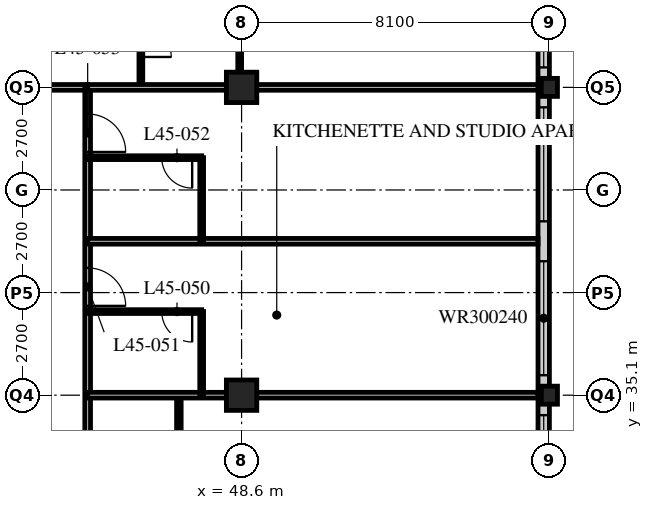
"""IFC4 building model, lengths in metres.
Left out: names, types, materials, properties, quantities, classifications, styles, units other than length and angle.
Written with IfcOpenShell. Run it as: python <this file> out.ifc"""

import sys

from ifc_helpers import new_model, si_unit, direction, frame, frame_2d, origin, origin_2d, place, context, subcontext, project, spatial, rectangle, hollow_rectangle, i_section, extrude, element, fill, save


model = new_model("IFC4")
c1 = context("Model", 3, precision=1e-05, world=origin(), true_north=direction((0.0, 1.0)))
c2 = subcontext(c1, "Body", "Model", "MODEL_VIEW")
j1 = project(units=[si_unit("LENGTHUNIT", "METRE"), si_unit("PLANEANGLEUNIT", "RADIAN")], contexts=[c1])
p1 = place(None, origin())
s1 = spatial("IfcSite", under=j1, at=p1, CompositionType="ELEMENT")
p2 = place(p1, origin())
s2 = spatial("IfcBuilding", under=s1, at=p2, CompositionType="ELEMENT")
p3 = place(p2, frame((0.0, 0.0, 177.6)))
s3 = spatial("IfcBuildingStorey", under=s2, at=p3, CompositionType="ELEMENT", Elevation=177.6)
for number, where, z_axis, x_axis in (
    (1, (48.6, 35.1, 0.0), (0.0, 0.0, 1.0), (1.0, 0.0, 0.0)),
    (2, (48.6, 43.2, 0.0), (0.0, 0.0, 1.0), (1.0, 0.0, 0.0)),
):
    element("IfcColumn", number, at=place(p3, frame(where, z_axis=z_axis, x_axis=x_axis)), inside=s3, PredefinedType="COLUMN", context=c2, shape_type="SweptSolid", body=[
        extrude(hollow_rectangle(XDim=0.8, YDim=0.8, WallThickness=0.08, at=origin_2d()), origin(), (0.0, 0.0, 1.0), 3.6),
    ])
for number, where, z_axis, x_axis in (
    (3, (56.7, 35.1, 0.0), (0.0, 0.0, 1.0), (1.0, 0.0, 0.0)),
    (4, (56.7, 43.2, 0.0), (0.0, 0.0, 1.0), (1.0, 0.0, 0.0)),
):
    element("IfcColumn", number, at=place(p3, frame(where, z_axis=z_axis, x_axis=x_axis)), inside=s3, PredefinedType="COLUMN", context=c2, shape_type="SweptSolid", body=[
        extrude(i_section(OverallWidth=0.424, OverallDepth=0.475, WebThickness=0.048, FlangeThickness=0.077, FilletRadius=0.015, at=origin_2d()), origin(), (0.0, 0.0, 1.0), 3.6),
    ])
p4 = place(p3, frame((56.55, 19.2, 0.0), z_axis=(0.0, 0.0, 1.0), x_axis=(0.0, 1.0, 0.0)))
e5 = element("IfcWall", 5, at=p4, inside=s3, PredefinedType="SOLIDWALL", context=c2, shape_type="SweptSolid", body=[
    extrude(rectangle(XDim=32.1, YDim=0.3, at=frame_2d((16.05, 0.0))), origin(), (0.0, 0.0, 1.0), 3.39),
])
p5 = place(p4, frame((0.225, 0.0, 0.6)))
e6 = element("IfcOpeningElement", 6, at=p5, cuts=e5, PredefinedType="OPENING", context=c2, shape_type="SweptSolid", body=[
    extrude(rectangle(XDim=3.0, YDim=2.4, at=frame_2d((1.5, 1.2))), frame((0.0, 0.16, 0.0), z_axis=(0.0, -1.0, 0.0), x_axis=(1.0, 0.0, 0.0)), (0.0, 0.0, 1.0), 0.32),
])
p6 = place(p4, frame((4.275, 0.0, 0.6)))
e7 = element("IfcOpeningElement", 7, at=p6, cuts=e5, PredefinedType="OPENING", context=c2, shape_type="SweptSolid", body=[
    extrude(rectangle(XDim=3.0, YDim=2.4, at=frame_2d((1.5, 1.2))), frame((0.0, 0.16, 0.0), z_axis=(0.0, -1.0, 0.0), x_axis=(1.0, 0.0, 0.0)), (0.0, 0.0, 1.0), 0.32),
])
p7 = place(p4, frame((8.325, 0.0, 0.6)))
e8 = element("IfcOpeningElement", 8, at=p7, cuts=e5, PredefinedType="OPENING", context=c2, shape_type="SweptSolid", body=[
    extrude(rectangle(XDim=3.0, YDim=2.4, at=frame_2d((1.5, 1.2))), frame((0.0, 0.16, 0.0), z_axis=(0.0, -1.0, 0.0), x_axis=(1.0, 0.0, 0.0)), (0.0, 0.0, 1.0), 0.32),
])
p8 = place(p4, frame((12.375, 0.0, 0.6)))
e9 = element("IfcOpeningElement", 9, at=p8, cuts=e5, PredefinedType="OPENING", context=c2, shape_type="SweptSolid", body=[
    extrude(rectangle(XDim=3.0, YDim=2.4, at=frame_2d((1.5, 1.2))), frame((0.0, 0.16, 0.0), z_axis=(0.0, -1.0, 0.0), x_axis=(1.0, 0.0, 0.0)), (0.0, 0.0, 1.0), 0.32),
])
p9 = place(p4, frame((16.425, 0.0, 0.6)))
e10 = element("IfcOpeningElement", 10, at=p9, cuts=e5, PredefinedType="OPENING", context=c2, shape_type="SweptSolid", body=[
    extrude(rectangle(XDim=3.0, YDim=2.4, at=frame_2d((1.5, 1.2))), frame((0.0, 0.16, 0.0), z_axis=(0.0, -1.0, 0.0), x_axis=(1.0, 0.0, 0.0)), (0.0, 0.0, 1.0), 0.32),
])
p10 = place(p4, frame((20.475, 0.0, 0.6)))
e11 = element("IfcOpeningElement", 11, at=p10, cuts=e5, PredefinedType="OPENING", context=c2, shape_type="SweptSolid", body=[
    extrude(rectangle(XDim=3.0, YDim=2.4, at=frame_2d((1.5, 1.2))), frame((0.0, 0.16, 0.0), z_axis=(0.0, -1.0, 0.0), x_axis=(1.0, 0.0, 0.0)), (0.0, 0.0, 1.0), 0.32),
])
p11 = place(p4, frame((24.525, 0.0, 0.6)))
e12 = element("IfcOpeningElement", 12, at=p11, cuts=e5, PredefinedType="OPENING", context=c2, shape_type="SweptSolid", body=[
    extrude(rectangle(XDim=3.0, YDim=2.4, at=frame_2d((1.5, 1.2))), frame((0.0, 0.16, 0.0), z_axis=(0.0, -1.0, 0.0), x_axis=(1.0, 0.0, 0.0)), (0.0, 0.0, 1.0), 0.32),
])
p12 = place(p4, frame((28.575, 0.0, 0.6)))
e13 = element("IfcOpeningElement", 13, at=p12, cuts=e5, PredefinedType="OPENING", context=c2, shape_type="SweptSolid", body=[
    extrude(rectangle(XDim=3.0, YDim=2.4, at=frame_2d((1.5, 1.2))), frame((0.0, 0.16, 0.0), z_axis=(0.0, -1.0, 0.0), x_axis=(1.0, 0.0, 0.0)), (0.0, 0.0, 1.0), 0.32),
])
p13 = place(p3, frame((12.15, 43.2, 0.0), z_axis=(0.0, 0.0, 1.0), x_axis=(1.0, 0.0, 0.0)))
e14 = element("IfcWall", 14, at=p13, inside=s3, PredefinedType="PARTITIONING", context=c2, shape_type="SweptSolid", body=[
    extrude(rectangle(XDim=32.4, YDim=0.15, at=frame_2d((16.2, 0.0))), origin(), (0.0, 0.0, 1.0), 2.778),
])
p14 = place(p13, frame((4.95, 0.0, 0.0)))
e15 = element("IfcOpeningElement", 15, at=p14, cuts=e14, PredefinedType="OPENING", context=c2, shape_type="SweptSolid", body=[
    extrude(rectangle(XDim=1.0, YDim=2.1, at=frame_2d((0.5, 1.05))), frame((0.0, 0.085, 0.0), z_axis=(0.0, -1.0, 0.0), x_axis=(1.0, 0.0, 0.0)), (0.0, 0.0, 1.0), 0.17),
])
p15 = place(p13, frame((13.05, 0.0, 0.0)))
e16 = element("IfcOpeningElement", 16, at=p15, cuts=e14, PredefinedType="OPENING", context=c2, shape_type="SweptSolid", body=[
    extrude(rectangle(XDim=1.0, YDim=2.1, at=frame_2d((0.5, 1.05))), frame((0.0, 0.085, 0.0), z_axis=(0.0, -1.0, 0.0), x_axis=(1.0, 0.0, 0.0)), (0.0, 0.0, 1.0), 0.17),
])
p16 = place(p13, frame((21.15, 0.0, 0.0)))
e17 = element("IfcOpeningElement", 17, at=p16, cuts=e14, PredefinedType="OPENING", context=c2, shape_type="SweptSolid", body=[
    extrude(rectangle(XDim=1.0, YDim=2.1, at=frame_2d((0.5, 1.05))), frame((0.0, 0.085, 0.0), z_axis=(0.0, -1.0, 0.0), x_axis=(1.0, 0.0, 0.0)), (0.0, 0.0, 1.0), 0.17),
])
p17 = place(p13, frame((29.875, 0.0, 0.0)))
e18 = element("IfcOpeningElement", 18, at=p17, cuts=e14, PredefinedType="OPENING", context=c2, shape_type="SweptSolid", body=[
    extrude(rectangle(XDim=1.0, YDim=2.1, at=frame_2d((0.5, 1.05))), frame((0.0, 0.085, 0.0), z_axis=(0.0, -1.0, 0.0), x_axis=(1.0, 0.0, 0.0)), (0.0, 0.0, 1.0), 0.17),
])
p18 = place(p13, frame((1.525, 0.0, 0.0)))
e19 = element("IfcOpeningElement", 19, at=p18, cuts=e14, PredefinedType="OPENING", context=c2, shape_type="SweptSolid", body=[
    extrude(rectangle(XDim=1.0, YDim=2.1, at=frame_2d((0.5, 1.05))), frame((0.0, 0.085, 0.0), z_axis=(0.0, -1.0, 0.0), x_axis=(1.0, 0.0, 0.0)), (0.0, 0.0, 1.0), 0.17),
])
p19 = place(p3, frame((44.55, 18.9, 0.0), z_axis=(0.0, 0.0, 1.0), x_axis=(0.0, 1.0, 0.0)))
e20 = element("IfcWall", 20, at=p19, inside=s3, PredefinedType="PARTITIONING", context=c2, shape_type="SweptSolid", body=[
    extrude(rectangle(XDim=24.3, YDim=0.15, at=frame_2d((12.15, 0.0))), origin(), (0.0, 0.0, 1.0), 3.39),
])
p20 = place(p19, frame((2.35, 0.0, 0.0)))
e21 = element("IfcOpeningElement", 21, at=p20, cuts=e20, PredefinedType="OPENING", context=c2, shape_type="SweptSolid", body=[
    extrude(rectangle(XDim=1.0, YDim=2.1, at=frame_2d((0.5, 1.05))), frame((0.0, 0.085, 0.0), z_axis=(0.0, -1.0, 0.0), x_axis=(1.0, 0.0, 0.0)), (0.0, 0.0, 1.0), 0.17),
])
p21 = place(p19, frame((4.45, 0.0, 0.0)))
e22 = element("IfcOpeningElement", 22, at=p21, cuts=e20, PredefinedType="OPENING", context=c2, shape_type="SweptSolid", body=[
    extrude(rectangle(XDim=1.0, YDim=2.1, at=frame_2d((0.5, 1.05))), frame((0.0, 0.085, 0.0), z_axis=(0.0, -1.0, 0.0), x_axis=(1.0, 0.0, 0.0)), (0.0, 0.0, 1.0), 0.17),
])
p22 = place(p19, frame((18.55, 0.0, 0.0)))
e23 = element("IfcOpeningElement", 23, at=p22, cuts=e20, PredefinedType="OPENING", context=c2, shape_type="SweptSolid", body=[
    extrude(rectangle(XDim=1.0, YDim=2.1, at=frame_2d((0.5, 1.05))), frame((0.0, 0.085, 0.0), z_axis=(0.0, -1.0, 0.0), x_axis=(1.0, 0.0, 0.0)), (0.0, 0.0, 1.0), 0.17),
])
p23 = place(p19, frame((22.6, 0.0, 0.0)))
e24 = element("IfcOpeningElement", 24, at=p23, cuts=e20, PredefinedType="OPENING", context=c2, shape_type="SweptSolid", body=[
    extrude(rectangle(XDim=1.0, YDim=2.1, at=frame_2d((0.5, 1.05))), frame((0.0, 0.085, 0.0), z_axis=(0.0, -1.0, 0.0), x_axis=(1.0, 0.0, 0.0)), (0.0, 0.0, 1.0), 0.17),
])
p24 = place(p3, frame((46.95, 22.95, 0.0), z_axis=(0.0, 0.0, 1.0), x_axis=(0.0, 1.0, 0.0)))
e25 = element("IfcWall", 25, at=p24, inside=s3, PredefinedType="PARTITIONING", context=c2, shape_type="SweptSolid", body=[
    extrude(rectangle(XDim=12.15, YDim=0.12, at=frame_2d((6.075, 0.0))), origin(), (0.0, 0.0, 1.0), 3.39),
])
p25 = place(p24, frame((0.975, 0.0, 0.0)))
e26 = element("IfcOpeningElement", 26, at=p25, cuts=e25, PredefinedType="OPENING", context=c2, shape_type="SweptSolid", body=[
    extrude(rectangle(XDim=0.85, YDim=2.1, at=frame_2d((0.425, 1.05))), frame((0.0, 0.07, 0.0), z_axis=(0.0, -1.0, 0.0), x_axis=(1.0, 0.0, 0.0)), (0.0, 0.0, 1.0), 0.14),
])
p26 = place(p24, frame((8.425, 0.0, 0.0)))
e27 = element("IfcOpeningElement", 27, at=p26, cuts=e25, PredefinedType="OPENING", context=c2, shape_type="SweptSolid", body=[
    extrude(rectangle(XDim=0.85, YDim=2.1, at=frame_2d((0.425, 1.05))), frame((0.0, 0.07, 0.0), z_axis=(0.0, -1.0, 0.0), x_axis=(1.0, 0.0, 0.0)), (0.0, 0.0, 1.0), 0.14),
])
p27 = place(p3, frame((44.55, 35.1, 0.0), z_axis=(0.0, 0.0, 1.0), x_axis=(1.0, 0.0, 0.0)))
e28 = element("IfcWall", 28, at=p27, inside=s3, PredefinedType="PARTITIONING", context=c2, shape_type="SweptSolid", body=[
    extrude(rectangle(XDim=11.85, YDim=0.15, at=frame_2d((5.925, 0.0))), origin(), (0.0, 0.0, 1.0), 2.778),
])
p28 = place(p3, frame((47.55, 35.1, 0.0), z_axis=(0.0, 0.0, 1.0), x_axis=(0.0, 1.0, 0.0)))
e29 = element("IfcWall", 29, at=p28, inside=s3, PredefinedType="PARTITIONING", context=c2, shape_type="SweptSolid", body=[
    extrude(rectangle(XDim=2.2, YDim=0.1, at=frame_2d((1.1, 0.0))), origin(), (0.0, 0.0, 1.0), 3.39),
])
p29 = place(p3, frame((44.55, 37.3, 0.0), z_axis=(0.0, 0.0, 1.0), x_axis=(1.0, 0.0, 0.0)))
e30 = element("IfcWall", 30, at=p29, inside=s3, PredefinedType="PARTITIONING", context=c2, shape_type="SweptSolid", body=[
    extrude(rectangle(XDim=3.0, YDim=0.1, at=frame_2d((1.5, 0.0))), origin(), (0.0, 0.0, 1.0), 3.39),
])
p30 = place(p29, frame((1.95, 0.0, 0.0)))
e31 = element("IfcOpeningElement", 31, at=p30, cuts=e30, PredefinedType="OPENING", context=c2, shape_type="SweptSolid", body=[
    extrude(rectangle(XDim=0.8, YDim=2.1, at=frame_2d((0.4, 1.05))), frame((0.0, 0.06, 0.0), z_axis=(0.0, -1.0, 0.0), x_axis=(1.0, 0.0, 0.0)), (0.0, 0.0, 1.0), 0.12),
])
p31 = place(p3, frame((44.55, 39.15, 0.0), z_axis=(0.0, 0.0, 1.0), x_axis=(1.0, 0.0, 0.0)))
e32 = element("IfcWall", 32, at=p31, inside=s3, PredefinedType="PARTITIONING", context=c2, shape_type="SweptSolid", body=[
    extrude(rectangle(XDim=11.85, YDim=0.15, at=frame_2d((5.925, 0.0))), origin(), (0.0, 0.0, 1.0), 3.39),
])
p32 = place(p3, frame((47.55, 39.15, 0.0), z_axis=(0.0, 0.0, 1.0), x_axis=(0.0, 1.0, 0.0)))
e33 = element("IfcWall", 33, at=p32, inside=s3, PredefinedType="PARTITIONING", context=c2, shape_type="SweptSolid", body=[
    extrude(rectangle(XDim=2.2, YDim=0.1, at=frame_2d((1.1, 0.0))), origin(), (0.0, 0.0, 1.0), 3.39),
])
p33 = place(p3, frame((44.55, 41.35, 0.0), z_axis=(0.0, 0.0, 1.0), x_axis=(1.0, 0.0, 0.0)))
e34 = element("IfcWall", 34, at=p33, inside=s3, PredefinedType="PARTITIONING", context=c2, shape_type="SweptSolid", body=[
    extrude(rectangle(XDim=3.0, YDim=0.1, at=frame_2d((1.5, 0.0))), origin(), (0.0, 0.0, 1.0), 3.39),
])
p34 = place(p33, frame((1.95, 0.0, 0.0)))
e35 = element("IfcOpeningElement", 35, at=p34, cuts=e34, PredefinedType="OPENING", context=c2, shape_type="SweptSolid", body=[
    extrude(rectangle(XDim=0.8, YDim=2.1, at=frame_2d((0.4, 1.05))), frame((0.0, 0.06, 0.0), z_axis=(0.0, -1.0, 0.0), x_axis=(1.0, 0.0, 0.0)), (0.0, 0.0, 1.0), 0.12),
])
p35 = place(p3, frame((45.95, 43.2, 0.0), z_axis=(0.0, 0.0, 1.0), x_axis=(0.0, 1.0, 0.0)))
e36 = element("IfcWall", 36, at=p35, inside=s3, PredefinedType="PARTITIONING", context=c2, shape_type="SweptSolid", body=[
    extrude(rectangle(XDim=2.4, YDim=0.1, at=frame_2d((1.2, 0.0))), origin(), (0.0, 0.0, 1.0), 3.39),
])
p36 = place(p35, frame((0.8, 0.0, 0.0)))
e37 = element("IfcOpeningElement", 37, at=p36, cuts=e36, PredefinedType="OPENING", context=c2, shape_type="SweptSolid", body=[
    extrude(rectangle(XDim=0.8, YDim=2.1, at=frame_2d((0.4, 1.05))), frame((0.0, 0.06, 0.0), z_axis=(0.0, -1.0, 0.0), x_axis=(1.0, 0.0, 0.0)), (0.0, 0.0, 1.0), 0.12),
])
p37 = place(p3, frame((48.55, 43.2, 0.0), z_axis=(0.0, 0.0, 1.0), x_axis=(0.0, 1.0, 0.0)))
e38 = element("IfcWall", 38, at=p37, inside=s3, PredefinedType="PARTITIONING", context=c2, shape_type="SweptSolid", body=[
    extrude(rectangle(XDim=2.4, YDim=0.1, at=frame_2d((1.2, 0.0))), origin(), (0.0, 0.0, 1.0), 2.778),
])
p38 = place(p3, frame((44.55, 43.2, 0.0), z_axis=(0.0, 0.0, 1.0), x_axis=(1.0, 0.0, 0.0)))
e39 = element("IfcWall", 39, at=p38, inside=s3, PredefinedType="PARTITIONING", context=c2, shape_type="SweptSolid", body=[
    extrude(rectangle(XDim=11.85, YDim=0.15, at=frame_2d((5.925, 0.0))), origin(), (0.0, 0.0, 1.0), 2.778),
])
p39 = place(p8, origin())
e40 = element("IfcWindow", 40, at=p39, inside=s3, PartitioningType="SINGLE_PANEL", PredefinedType="WINDOW", context=c2, shape_type="SweptSolid", body=[
    extrude(rectangle(XDim=3.0, YDim=2.4, at=frame_2d((1.5, 1.2))), frame((0.0, 0.03, 0.0), z_axis=(0.0, -1.0, 0.0), x_axis=(1.0, 0.0, 0.0)), (0.0, 0.0, 1.0), 0.06),
])
fill(e9, e40)
p40 = place(p9, origin())
e41 = element("IfcWindow", 41, at=p40, inside=s3, PartitioningType="SINGLE_PANEL", PredefinedType="WINDOW", context=c2, shape_type="SweptSolid", body=[
    extrude(rectangle(XDim=3.0, YDim=2.4, at=frame_2d((1.5, 1.2))), frame((0.0, 0.03, 0.0), z_axis=(0.0, -1.0, 0.0), x_axis=(1.0, 0.0, 0.0)), (0.0, 0.0, 1.0), 0.06),
])
fill(e10, e41)
p41 = place(p10, origin())
e42 = element("IfcWindow", 42, at=p41, inside=s3, PartitioningType="SINGLE_PANEL", PredefinedType="WINDOW", context=c2, shape_type="SweptSolid", body=[
    extrude(rectangle(XDim=3.0, YDim=2.4, at=frame_2d((1.5, 1.2))), frame((0.0, 0.03, 0.0), z_axis=(0.0, -1.0, 0.0), x_axis=(1.0, 0.0, 0.0)), (0.0, 0.0, 1.0), 0.06),
])
fill(e11, e42)
p42 = place(p11, origin())
e43 = element("IfcWindow", 43, at=p42, inside=s3, PartitioningType="SINGLE_PANEL", PredefinedType="WINDOW", context=c2, shape_type="SweptSolid", body=[
    extrude(rectangle(XDim=3.0, YDim=2.4, at=frame_2d((1.5, 1.2))), frame((0.0, 0.03, 0.0), z_axis=(0.0, -1.0, 0.0), x_axis=(1.0, 0.0, 0.0)), (0.0, 0.0, 1.0), 0.06),
])
fill(e12, e43)
p43 = place(p30, origin())
e44 = element("IfcDoor", 44, at=p43, inside=s3, OperationType="SINGLE_SWING_LEFT", PredefinedType="DOOR", context=c2, shape_type="SweptSolid", body=[
    extrude(rectangle(XDim=0.8, YDim=2.1, at=frame_2d((0.4, 1.05))), frame((0.0, 0.025, 0.0), z_axis=(0.0, -1.0, 0.0), x_axis=(1.0, 0.0, 0.0)), (0.0, 0.0, 1.0), 0.05),
])
fill(e31, e44)
p44 = place(p22, origin())
e45 = element("IfcDoor", 45, at=p44, inside=s3, OperationType="SINGLE_SWING_RIGHT", PredefinedType="DOOR", context=c2, shape_type="SweptSolid", body=[
    extrude(rectangle(XDim=1.0, YDim=2.1, at=frame_2d((0.5, 1.05))), frame((0.0, 0.025, 0.0), z_axis=(0.0, -1.0, 0.0), x_axis=(1.0, 0.0, 0.0)), (0.0, 0.0, 1.0), 0.05),
])
fill(e23, e45)
p45 = place(p34, origin())
e46 = element("IfcDoor", 46, at=p45, inside=s3, OperationType="SINGLE_SWING_LEFT", PredefinedType="DOOR", context=c2, shape_type="SweptSolid", body=[
    extrude(rectangle(XDim=0.8, YDim=2.1, at=frame_2d((0.4, 1.05))), frame((0.0, 0.025, 0.0), z_axis=(0.0, -1.0, 0.0), x_axis=(1.0, 0.0, 0.0)), (0.0, 0.0, 1.0), 0.05),
])
fill(e35, e46)
p46 = place(p23, origin())
e47 = element("IfcDoor", 47, at=p46, inside=s3, OperationType="SINGLE_SWING_RIGHT", PredefinedType="DOOR", context=c2, shape_type="SweptSolid", body=[
    extrude(rectangle(XDim=1.0, YDim=2.1, at=frame_2d((0.5, 1.05))), frame((0.0, 0.025, 0.0), z_axis=(0.0, -1.0, 0.0), x_axis=(1.0, 0.0, 0.0)), (0.0, 0.0, 1.0), 0.05),
])
fill(e24, e47)
p47 = place(p36, origin())
e48 = element("IfcDoor", 48, at=p47, inside=s3, OperationType="SINGLE_SWING_RIGHT", PredefinedType="DOOR", context=c2, shape_type="SweptSolid", body=[
    extrude(rectangle(XDim=0.8, YDim=2.1, at=frame_2d((0.4, 1.05))), frame((0.0, 0.025, 0.0), z_axis=(0.0, -1.0, 0.0), x_axis=(1.0, 0.0, 0.0)), (0.0, 0.0, 1.0), 0.05),
])
fill(e37, e48)
save(model, sys.argv[1])
